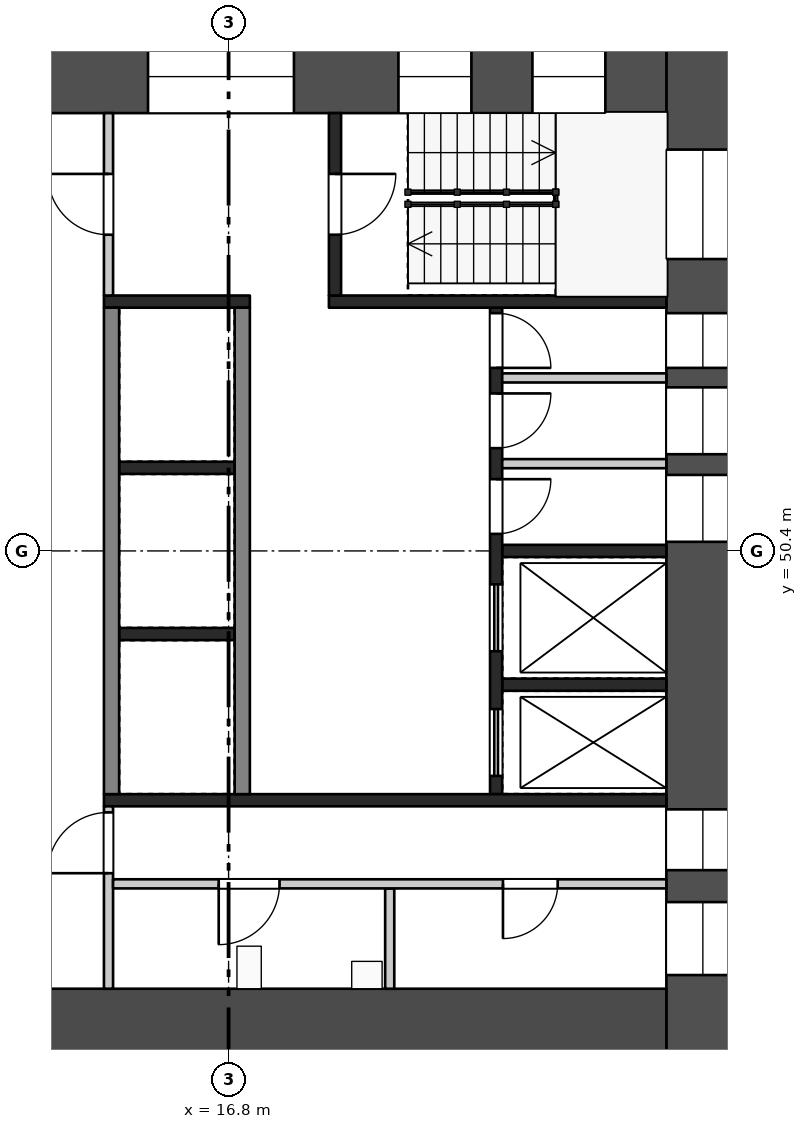
"""IFC4 building model, lengths in metres.
Left out: names, types, materials, properties, quantities, classifications, styles, units other than length and angle.
Written with IfcOpenShell. Run it as: python <this file> out.ifc"""

import sys

from ifc_helpers import new_model, si_unit, direction, frame, frame_2d, origin, place, context, subcontext, project, spatial, rectangle, extrude, element, fill, save


model = new_model("IFC4")
c1 = context("Model", 3, precision=1e-05, world=origin(), true_north=direction((0.0, 1.0)))
c2 = subcontext(c1, "Body", "Model", "MODEL_VIEW")
j1 = project(units=[si_unit("LENGTHUNIT", "METRE"), si_unit("PLANEANGLEUNIT", "RADIAN")], contexts=[c1])
p1 = place(None, origin())
s1 = spatial("IfcSite", under=j1, at=p1, CompositionType="ELEMENT")
p2 = place(p1, origin())
s2 = spatial("IfcBuilding", under=s1, at=p2, CompositionType="ELEMENT")
p3 = place(p2, frame((0.0, 0.0, 112.7)))
s3 = spatial("IfcBuildingStorey", under=s2, at=p3, CompositionType="ELEMENT", Elevation=112.7)
p4 = place(p3, frame((24.6, 58.8, 0.0), z_axis=(0.0, 0.0, 1.0), x_axis=(0.0, -1.0, 0.0)))
e1 = element("IfcWall", 1, at=p4, inside=s3, PredefinedType="SHEAR", context=c2, shape_type="SweptSolid", body=[
    extrude(rectangle(XDim=16.8, YDim=1.2, at=frame_2d((8.4, 0.0))), origin(), (0.0, 0.0, 1.0), 3.22),
])
p5 = place(p4, frame((1.8, 0.0, 0.5)))
e2 = element("IfcOpeningElement", 2, at=p5, cuts=e1, PredefinedType="OPENING", context=c2, shape_type="SweptSolid", body=[
    extrude(rectangle(XDim=1.8, YDim=2.4, at=frame_2d((0.9, 1.2))), frame((0.0, 0.61, 0.0), z_axis=(0.0, -1.0, 0.0), x_axis=(1.0, 0.0, 0.0)), (0.0, 0.0, 1.0), 1.22),
])
p6 = place(p4, frame((4.49, 0.0, 1.6)))
e3 = element("IfcOpeningElement", 3, at=p6, cuts=e1, PredefinedType="OPENING", context=c2, shape_type="SweptSolid", body=[
    extrude(rectangle(XDim=0.9, YDim=1.2, at=frame_2d((0.45, 0.6))), frame((0.0, 0.61, 0.0), z_axis=(0.0, -1.0, 0.0), x_axis=(1.0, 0.0, 0.0)), (0.0, 0.0, 1.0), 1.22),
])
p7 = place(p4, frame((5.71, 0.0, 1.6)))
e4 = element("IfcOpeningElement", 4, at=p7, cuts=e1, PredefinedType="OPENING", context=c2, shape_type="SweptSolid", body=[
    extrude(rectangle(XDim=1.1, YDim=1.2, at=frame_2d((0.55, 0.6))), frame((0.0, 0.61, 0.0), z_axis=(0.0, -1.0, 0.0), x_axis=(1.0, 0.0, 0.0)), (0.0, 0.0, 1.0), 1.22),
])
p8 = place(p4, frame((7.15, 0.0, 1.6)))
e5 = element("IfcOpeningElement", 5, at=p8, cuts=e1, PredefinedType="OPENING", context=c2, shape_type="SweptSolid", body=[
    extrude(rectangle(XDim=1.1, YDim=1.2, at=frame_2d((0.55, 0.6))), frame((0.0, 0.61, 0.0), z_axis=(0.0, -1.0, 0.0), x_axis=(1.0, 0.0, 0.0)), (0.0, 0.0, 1.0), 1.22),
])
p9 = place(p4, frame((12.65, 0.0, 0.6)))
e6 = element("IfcOpeningElement", 6, at=p9, cuts=e1, PredefinedType="OPENING", context=c2, shape_type="SweptSolid", body=[
    extrude(rectangle(XDim=1.0, YDim=2.1, at=frame_2d((0.5, 1.05))), frame((0.0, 0.61, 0.0), z_axis=(0.0, -1.0, 0.0), x_axis=(1.0, 0.0, 0.0)), (0.0, 0.0, 1.0), 1.22),
])
p10 = place(p4, frame((14.175, 0.0, 1.6)))
e7 = element("IfcOpeningElement", 7, at=p10, cuts=e1, PredefinedType="OPENING", context=c2, shape_type="SweptSolid", body=[
    extrude(rectangle(XDim=1.2, YDim=1.2, at=frame_2d((0.6, 0.6))), frame((0.0, 0.61, 0.0), z_axis=(0.0, -1.0, 0.0), x_axis=(1.0, 0.0, 0.0)), (0.0, 0.0, 1.0), 1.22),
])
p11 = place(p3, frame((9.6, 58.2, 0.0), z_axis=(0.0, 0.0, 1.0), x_axis=(1.0, 0.0, 0.0)))
e8 = element("IfcWall", 8, at=p11, inside=s3, PredefinedType="SHEAR", context=c2, shape_type="SweptSolid", body=[
    extrude(rectangle(XDim=14.4, YDim=1.2, at=frame_2d((7.2, 0.0))), origin(), (0.0, 0.0, 1.0), 3.22),
])
p12 = place(p11, frame((1.105, 0.0, 0.6)))
e9 = element("IfcOpeningElement", 9, at=p12, cuts=e8, PredefinedType="OPENING", context=c2, shape_type="SweptSolid", body=[
    extrude(rectangle(XDim=3.0, YDim=2.1, at=frame_2d((1.5, 1.05))), frame((0.0, 0.61, 0.0), z_axis=(0.0, -1.0, 0.0), x_axis=(1.0, 0.0, 0.0)), (0.0, 0.0, 1.0), 1.22),
])
p13 = place(p11, frame((5.875, 0.0, 0.6)))
e10 = element("IfcOpeningElement", 10, at=p13, cuts=e8, PredefinedType="OPENING", context=c2, shape_type="SweptSolid", body=[
    extrude(rectangle(XDim=2.4, YDim=2.1, at=frame_2d((1.2, 1.05))), frame((0.0, 0.61, 0.0), z_axis=(0.0, -1.0, 0.0), x_axis=(1.0, 0.0, 0.0)), (0.0, 0.0, 1.0), 1.22),
])
p14 = place(p11, frame((9.993, 0.0, 0.5)))
e11 = element("IfcOpeningElement", 11, at=p14, cuts=e8, PredefinedType="OPENING", context=c2, shape_type="SweptSolid", body=[
    extrude(rectangle(XDim=1.2, YDim=2.4, at=frame_2d((0.6, 1.2))), frame((0.0, 0.61, 0.0), z_axis=(0.0, -1.0, 0.0), x_axis=(1.0, 0.0, 0.0)), (0.0, 0.0, 1.0), 1.22),
])
p15 = place(p11, frame((12.197, 0.0, 0.5)))
e12 = element("IfcOpeningElement", 12, at=p15, cuts=e8, PredefinedType="OPENING", context=c2, shape_type="SweptSolid", body=[
    extrude(rectangle(XDim=1.2, YDim=2.4, at=frame_2d((0.6, 1.2))), frame((0.0, 0.61, 0.0), z_axis=(0.0, -1.0, 0.0), x_axis=(1.0, 0.0, 0.0)), (0.0, 0.0, 1.0), 1.22),
])
p16 = place(p3, frame((9.6, 42.6, 0.0), z_axis=(0.0, 0.0, 1.0), x_axis=(1.0, 0.0, 0.0)))
e13 = element("IfcWall", 13, at=p16, inside=s3, PredefinedType="SHEAR", context=c2, shape_type="SweptSolid", body=[
    extrude(rectangle(XDim=14.4, YDim=1.2, at=frame_2d((7.2, 0.0))), origin(), (0.0, 0.0, 1.0), 3.22),
])
p17 = place(p16, frame((2.1, 0.0, 0.0)))
e14 = element("IfcOpeningElement", 14, at=p17, cuts=e13, PredefinedType="OPENING", context=c2, shape_type="SweptSolid", body=[
    extrude(rectangle(XDim=1.8, YDim=2.1, at=frame_2d((0.9, 1.05))), frame((0.0, 0.61, 0.0), z_axis=(0.0, -1.0, 0.0), x_axis=(1.0, 0.0, 0.0)), (0.0, 0.0, 1.0), 1.22),
])
for number, where, z_axis, x_axis in (
    (15, (15.0, 51.767, 0.0), (0.0, 0.0, 1.0), (1.0, 0.0, 0.0)),
    (16, (15.0, 49.033, 0.0), (0.0, 0.0, 1.0), (1.0, 0.0, 0.0)),
):
    element("IfcWall", number, at=place(p3, frame(where, z_axis=z_axis, x_axis=x_axis)), inside=s3, PredefinedType="SHEAR", context=c2, shape_type="SweptSolid", body=[
        extrude(rectangle(XDim=1.9, YDim=0.2, at=frame_2d((0.95, 0.0))), origin(), (0.0, 0.0, 1.0), 3.22),
    ])
for number, where, z_axis, x_axis in (
    (17, (14.875, 54.4, 0.0), (0.0, 0.0, 1.0), (0.0, -1.0, 0.0)),
    (18, (17.025, 54.4, 0.0), (0.0, 0.0, 1.0), (0.0, -1.0, 0.0)),
):
    element("IfcWall", number, at=place(p3, frame(where, z_axis=z_axis, x_axis=x_axis)), inside=s3, PredefinedType="SHEAR", context=c2, shape_type="SweptSolid", body=[
        extrude(rectangle(XDim=8.0, YDim=0.25, at=frame_2d((4.0, 0.0))), origin(), (0.0, 0.0, 1.0), 3.22),
    ])
for number, where, z_axis, x_axis in (
    (19, (21.3, 50.4, 0.0), (0.0, 0.0, 1.0), (1.0, 0.0, 0.0)),
    (20, (21.3, 48.2, 0.0), (0.0, 0.0, 1.0), (1.0, 0.0, 0.0)),
):
    element("IfcWall", number, at=place(p3, frame(where, z_axis=z_axis, x_axis=x_axis)), inside=s3, PredefinedType="SHEAR", context=c2, shape_type="SweptSolid", body=[
        extrude(rectangle(XDim=2.7, YDim=0.2, at=frame_2d((1.35, 0.0))), origin(), (0.0, 0.0, 1.0), 3.22),
    ])
for number, where, z_axis, x_axis in (
    (21, (21.3, 53.245, 0.0), (0.0, 0.0, 1.0), (1.0, 0.0, 0.0)),
    (22, (21.3, 51.835, 0.0), (0.0, 0.0, 1.0), (1.0, 0.0, 0.0)),
):
    element("IfcWall", number, at=place(p3, frame(where, z_axis=z_axis, x_axis=x_axis)), inside=s3, PredefinedType="PARTITIONING", context=c2, shape_type="SweptSolid", body=[
        extrude(rectangle(XDim=2.7, YDim=0.15, at=frame_2d((1.35, 0.0))), origin(), (0.0, 0.0, 1.0), 3.22),
    ])
p18 = place(p3, frame((21.2, 54.4, 0.0), z_axis=(0.0, 0.0, 1.0), x_axis=(0.0, -1.0, 0.0)))
e23 = element("IfcWall", 23, at=p18, inside=s3, PredefinedType="SHEAR", context=c2, shape_type="SweptSolid", body=[
    extrude(rectangle(XDim=8.0, YDim=0.2, at=frame_2d((4.0, 0.0))), origin(), (0.0, 0.0, 1.0), 3.22),
])
p19 = place(p18, frame((0.09, 0.0, 0.0)))
e24 = element("IfcOpeningElement", 24, at=p19, cuts=e23, PredefinedType="OPENING", context=c2, shape_type="SweptSolid", body=[
    extrude(rectangle(XDim=0.9, YDim=2.1, at=frame_2d((0.45, 1.05))), frame((0.0, 0.11, 0.0), z_axis=(0.0, -1.0, 0.0), x_axis=(1.0, 0.0, 0.0)), (0.0, 0.0, 1.0), 0.22),
])
p20 = place(p18, frame((1.41, 0.0, 0.0)))
e25 = element("IfcOpeningElement", 25, at=p20, cuts=e23, PredefinedType="OPENING", context=c2, shape_type="SweptSolid", body=[
    extrude(rectangle(XDim=0.9, YDim=2.1, at=frame_2d((0.45, 1.05))), frame((0.0, 0.11, 0.0), z_axis=(0.0, -1.0, 0.0), x_axis=(1.0, 0.0, 0.0)), (0.0, 0.0, 1.0), 0.22),
])
p21 = place(p18, frame((2.82, 0.0, 0.0)))
e26 = element("IfcOpeningElement", 26, at=p21, cuts=e23, PredefinedType="OPENING", context=c2, shape_type="SweptSolid", body=[
    extrude(rectangle(XDim=0.9, YDim=2.1, at=frame_2d((0.45, 1.05))), frame((0.0, 0.11, 0.0), z_axis=(0.0, -1.0, 0.0), x_axis=(1.0, 0.0, 0.0)), (0.0, 0.0, 1.0), 0.22),
])
p22 = place(p18, frame((4.55, 0.0, 0.0)))
e27 = element("IfcOpeningElement", 27, at=p22, cuts=e23, PredefinedType="OPENING", context=c2, shape_type="SweptSolid", body=[
    extrude(rectangle(XDim=1.1, YDim=2.1, at=frame_2d((0.55, 1.05))), frame((0.0, 0.11, 0.0), z_axis=(0.0, -1.0, 0.0), x_axis=(1.0, 0.0, 0.0)), (0.0, 0.0, 1.0), 0.22),
])
p23 = place(p18, frame((6.6, 0.0, 0.0)))
e28 = element("IfcOpeningElement", 28, at=p23, cuts=e23, PredefinedType="OPENING", context=c2, shape_type="SweptSolid", body=[
    extrude(rectangle(XDim=1.1, YDim=2.1, at=frame_2d((0.55, 1.05))), frame((0.0, 0.11, 0.0), z_axis=(0.0, -1.0, 0.0), x_axis=(1.0, 0.0, 0.0)), (0.0, 0.0, 1.0), 0.22),
])
p24 = place(p3, frame((14.75, 54.5, 0.0), z_axis=(0.0, 0.0, 1.0), x_axis=(1.0, 0.0, 0.0)))
e29 = element("IfcWall", 29, at=p24, inside=s3, PredefinedType="SHEAR", context=c2, shape_type="SweptSolid", body=[
    extrude(rectangle(XDim=2.4, YDim=0.2, at=frame_2d((1.2, 0.0))), origin(), (0.0, 0.0, 1.0), 3.22),
])
p25 = place(p3, frame((18.45, 54.5, 0.0), z_axis=(0.0, 0.0, 1.0), x_axis=(1.0, 0.0, 0.0)))
e30 = element("IfcWall", 30, at=p25, inside=s3, PredefinedType="SHEAR", context=c2, shape_type="SweptSolid", body=[
    extrude(rectangle(XDim=5.55, YDim=0.2, at=frame_2d((2.775, 0.0))), origin(), (0.0, 0.0, 1.0), 3.22),
])
p26 = place(p3, frame((14.825, 57.6, 0.0), z_axis=(0.0, 0.0, 1.0), x_axis=(0.0, -1.0, 0.0)))
e31 = element("IfcWall", 31, at=p26, inside=s3, PredefinedType="PARTITIONING", context=c2, shape_type="SweptSolid", body=[
    extrude(rectangle(XDim=3.0, YDim=0.15, at=frame_2d((1.5, 0.0))), origin(), (0.0, 0.0, 1.0), 3.22),
])
p27 = place(p26, frame((1.0, 0.0, 0.0)))
e32 = element("IfcOpeningElement", 32, at=p27, cuts=e31, PredefinedType="OPENING", context=c2, shape_type="SweptSolid", body=[
    extrude(rectangle(XDim=1.0, YDim=2.1, at=frame_2d((0.5, 1.05))), frame((0.0, 0.085, 0.0), z_axis=(0.0, -1.0, 0.0), x_axis=(1.0, 0.0, 0.0)), (0.0, 0.0, 1.0), 0.17),
])
p28 = place(p3, frame((18.55, 57.6, 0.0), z_axis=(0.0, 0.0, 1.0), x_axis=(0.0, -1.0, 0.0)))
e33 = element("IfcWall", 33, at=p28, inside=s3, PredefinedType="SHEAR", context=c2, shape_type="SweptSolid", body=[
    extrude(rectangle(XDim=3.0, YDim=0.2, at=frame_2d((1.5, 0.0))), origin(), (0.0, 0.0, 1.0), 3.22),
])
p29 = place(p28, frame((1.0, 0.0, 0.0)))
e34 = element("IfcOpeningElement", 34, at=p29, cuts=e33, PredefinedType="OPENING", context=c2, shape_type="SweptSolid", body=[
    extrude(rectangle(XDim=1.0, YDim=2.1, at=frame_2d((0.5, 1.05))), frame((0.0, 0.11, 0.0), z_axis=(0.0, -1.0, 0.0), x_axis=(1.0, 0.0, 0.0)), (0.0, 0.0, 1.0), 0.22),
])
p30 = place(p3, frame((14.75, 46.3, 0.0), z_axis=(0.0, 0.0, 1.0), x_axis=(1.0, 0.0, 0.0)))
e35 = element("IfcWall", 35, at=p30, inside=s3, PredefinedType="SHEAR", context=c2, shape_type="SweptSolid", body=[
    extrude(rectangle(XDim=9.25, YDim=0.2, at=frame_2d((4.625, 0.0))), origin(), (0.0, 0.0, 1.0), 3.22),
])
p31 = place(p3, frame((14.825, 46.2, 0.0), z_axis=(0.0, 0.0, 1.0), x_axis=(0.0, -1.0, 0.0)))
e36 = element("IfcWall", 36, at=p31, inside=s3, PredefinedType="PARTITIONING", context=c2, shape_type="SweptSolid", body=[
    extrude(rectangle(XDim=3.0, YDim=0.15, at=frame_2d((1.5, 0.0))), origin(), (0.0, 0.0, 1.0), 3.22),
])
p32 = place(p31, frame((0.1, 0.0, 0.0)))
e37 = element("IfcOpeningElement", 37, at=p32, cuts=e36, PredefinedType="OPENING", context=c2, shape_type="SweptSolid", body=[
    extrude(rectangle(XDim=1.0, YDim=2.1, at=frame_2d((0.5, 1.05))), frame((0.0, 0.085, 0.0), z_axis=(0.0, -1.0, 0.0), x_axis=(1.0, 0.0, 0.0)), (0.0, 0.0, 1.0), 0.17),
])
p33 = place(p3, frame((19.45, 44.85, 0.0), z_axis=(0.0, 0.0, 1.0), x_axis=(0.0, -1.0, 0.0)))
e38 = element("IfcWall", 38, at=p33, inside=s3, PredefinedType="PARTITIONING", context=c2, shape_type="SweptSolid", body=[
    extrude(rectangle(XDim=1.65, YDim=0.15, at=frame_2d((0.825, 0.0))), origin(), (0.0, 0.0, 1.0), 3.22),
])
p34 = place(p3, frame((14.9, 44.925, 0.0), z_axis=(0.0, 0.0, 1.0), x_axis=(1.0, 0.0, 0.0)))
e39 = element("IfcWall", 39, at=p34, inside=s3, PredefinedType="PARTITIONING", context=c2, shape_type="SweptSolid", body=[
    extrude(rectangle(XDim=9.1, YDim=0.15, at=frame_2d((4.55, 0.0))), origin(), (0.0, 0.0, 1.0), 3.22),
])
p35 = place(p34, frame((1.738, 0.0, 0.0)))
e40 = element("IfcOpeningElement", 40, at=p35, cuts=e39, PredefinedType="OPENING", context=c2, shape_type="SweptSolid", body=[
    extrude(rectangle(XDim=1.0, YDim=2.1, at=frame_2d((0.5, 1.05))), frame((0.0, 0.085, 0.0), z_axis=(0.0, -1.0, 0.0), x_axis=(1.0, 0.0, 0.0)), (0.0, 0.0, 1.0), 0.17),
])
p36 = place(p34, frame((6.413, 0.0, 0.0)))
e41 = element("IfcOpeningElement", 41, at=p36, cuts=e39, PredefinedType="OPENING", context=c2, shape_type="SweptSolid", body=[
    extrude(rectangle(XDim=0.9, YDim=2.1, at=frame_2d((0.45, 1.05))), frame((0.0, 0.085, 0.0), z_axis=(0.0, -1.0, 0.0), x_axis=(1.0, 0.0, 0.0)), (0.0, 0.0, 1.0), 0.17),
])
p37 = place(p19, origin())
e42 = element("IfcDoor", 42, at=p37, inside=s3, OperationType="SINGLE_SWING_RIGHT", PredefinedType="DOOR", context=c2, shape_type="SweptSolid", body=[
    extrude(rectangle(XDim=0.9, YDim=2.1, at=frame_2d((0.45, 1.05))), frame((0.0, 0.025, 0.0), z_axis=(0.0, -1.0, 0.0), x_axis=(1.0, 0.0, 0.0)), (0.0, 0.0, 1.0), 0.05),
])
fill(e24, e42)
p38 = place(p20, origin())
e43 = element("IfcDoor", 43, at=p38, inside=s3, OperationType="SINGLE_SWING_LEFT", PredefinedType="DOOR", context=c2, shape_type="SweptSolid", body=[
    extrude(rectangle(XDim=0.9, YDim=2.1, at=frame_2d((0.45, 1.05))), frame((0.0, 0.025, 0.0), z_axis=(0.0, -1.0, 0.0), x_axis=(1.0, 0.0, 0.0)), (0.0, 0.0, 1.0), 0.05),
])
fill(e25, e43)
p39 = place(p21, origin())
e44 = element("IfcDoor", 44, at=p39, inside=s3, OperationType="SINGLE_SWING_LEFT", PredefinedType="DOOR", context=c2, shape_type="SweptSolid", body=[
    extrude(rectangle(XDim=0.9, YDim=2.1, at=frame_2d((0.45, 1.05))), frame((0.0, 0.025, 0.0), z_axis=(0.0, -1.0, 0.0), x_axis=(1.0, 0.0, 0.0)), (0.0, 0.0, 1.0), 0.05),
])
fill(e26, e44)
p40 = place(p22, origin())
e45 = element("IfcDoor", 45, at=p40, inside=s3, OperationType="DOUBLE_DOOR_SLIDING", PredefinedType="DOOR", context=c2, shape_type="SweptSolid", body=[
    extrude(rectangle(XDim=1.1, YDim=2.1, at=frame_2d((0.55, 1.05))), frame((0.0, 0.025, 0.0), z_axis=(0.0, -1.0, 0.0), x_axis=(1.0, 0.0, 0.0)), (0.0, 0.0, 1.0), 0.05),
])
fill(e27, e45)
p41 = place(p23, origin())
e46 = element("IfcDoor", 46, at=p41, inside=s3, OperationType="DOUBLE_DOOR_SLIDING", PredefinedType="DOOR", context=c2, shape_type="SweptSolid", body=[
    extrude(rectangle(XDim=1.1, YDim=2.1, at=frame_2d((0.55, 1.05))), frame((0.0, 0.025, 0.0), z_axis=(0.0, -1.0, 0.0), x_axis=(1.0, 0.0, 0.0)), (0.0, 0.0, 1.0), 0.05),
])
fill(e28, e46)
p42 = place(p27, frame((1.0, 0.0, 0.0), z_axis=(0.0, 0.0, 1.0), x_axis=(-1.0, 0.0, 0.0)))
e47 = element("IfcDoor", 47, at=p42, inside=s3, OperationType="SINGLE_SWING_RIGHT", PredefinedType="DOOR", context=c2, shape_type="SweptSolid", body=[
    extrude(rectangle(XDim=1.0, YDim=2.1, at=frame_2d((0.5, 1.05))), frame((0.0, 0.025, 0.0), z_axis=(0.0, -1.0, 0.0), x_axis=(1.0, 0.0, 0.0)), (0.0, 0.0, 1.0), 0.05),
])
fill(e32, e47)
p43 = place(p29, origin())
e48 = element("IfcDoor", 48, at=p43, inside=s3, OperationType="SINGLE_SWING_LEFT", PredefinedType="DOOR", context=c2, shape_type="SweptSolid", body=[
    extrude(rectangle(XDim=1.0, YDim=2.1, at=frame_2d((0.5, 1.05))), frame((0.0, 0.025, 0.0), z_axis=(0.0, -1.0, 0.0), x_axis=(1.0, 0.0, 0.0)), (0.0, 0.0, 1.0), 0.05),
])
fill(e34, e48)
p44 = place(p32, frame((1.0, 0.0, 0.0), z_axis=(0.0, 0.0, 1.0), x_axis=(-1.0, 0.0, 0.0)))
e49 = element("IfcDoor", 49, at=p44, inside=s3, OperationType="SINGLE_SWING_LEFT", PredefinedType="DOOR", context=c2, shape_type="SweptSolid", body=[
    extrude(rectangle(XDim=1.0, YDim=2.1, at=frame_2d((0.5, 1.05))), frame((0.0, 0.025, 0.0), z_axis=(0.0, -1.0, 0.0), x_axis=(1.0, 0.0, 0.0)), (0.0, 0.0, 1.0), 0.05),
])
fill(e37, e49)
p45 = place(p35, frame((1.0, 0.0, 0.0), z_axis=(0.0, 0.0, 1.0), x_axis=(-1.0, 0.0, 0.0)))
e50 = element("IfcDoor", 50, at=p45, inside=s3, OperationType="SINGLE_SWING_RIGHT", PredefinedType="DOOR", context=c2, shape_type="SweptSolid", body=[
    extrude(rectangle(XDim=1.0, YDim=2.1, at=frame_2d((0.5, 1.05))), frame((0.0, 0.025, 0.0), z_axis=(0.0, -1.0, 0.0), x_axis=(1.0, 0.0, 0.0)), (0.0, 0.0, 1.0), 0.05),
])
fill(e40, e50)
p46 = place(p36, frame((0.9, 0.0, 0.0), z_axis=(0.0, 0.0, 1.0), x_axis=(-1.0, 0.0, 0.0)))
e51 = element("IfcDoor", 51, at=p46, inside=s3, OperationType="SINGLE_SWING_RIGHT", PredefinedType="DOOR", context=c2, shape_type="SweptSolid", body=[
    extrude(rectangle(XDim=0.9, YDim=2.1, at=frame_2d((0.45, 1.05))), frame((0.0, 0.025, 0.0), z_axis=(0.0, -1.0, 0.0), x_axis=(1.0, 0.0, 0.0)), (0.0, 0.0, 1.0), 0.05),
])
fill(e41, e51)
p47 = place(p5, origin())
e52 = element("IfcWindow", 52, at=p47, inside=s3, PartitioningType="SINGLE_PANEL", PredefinedType="WINDOW", context=c2, shape_type="SweptSolid", body=[
    extrude(rectangle(XDim=1.8, YDim=2.4, at=frame_2d((0.9, 1.2))), frame((0.0, 0.03, 0.0), z_axis=(0.0, -1.0, 0.0), x_axis=(1.0, 0.0, 0.0)), (0.0, 0.0, 1.0), 0.06),
])
fill(e2, e52)
p48 = place(p6, origin())
e53 = element("IfcWindow", 53, at=p48, inside=s3, PartitioningType="SINGLE_PANEL", PredefinedType="WINDOW", context=c2, shape_type="SweptSolid", body=[
    extrude(rectangle(XDim=0.9, YDim=1.2, at=frame_2d((0.45, 0.6))), frame((0.0, 0.03, 0.0), z_axis=(0.0, -1.0, 0.0), x_axis=(1.0, 0.0, 0.0)), (0.0, 0.0, 1.0), 0.06),
])
fill(e3, e53)
p49 = place(p7, origin())
e54 = element("IfcWindow", 54, at=p49, inside=s3, PartitioningType="SINGLE_PANEL", PredefinedType="WINDOW", context=c2, shape_type="SweptSolid", body=[
    extrude(rectangle(XDim=1.1, YDim=1.2, at=frame_2d((0.55, 0.6))), frame((0.0, 0.03, 0.0), z_axis=(0.0, -1.0, 0.0), x_axis=(1.0, 0.0, 0.0)), (0.0, 0.0, 1.0), 0.06),
])
fill(e4, e54)
p50 = place(p8, origin())
e55 = element("IfcWindow", 55, at=p50, inside=s3, PartitioningType="SINGLE_PANEL", PredefinedType="WINDOW", context=c2, shape_type="SweptSolid", body=[
    extrude(rectangle(XDim=1.1, YDim=1.2, at=frame_2d((0.55, 0.6))), frame((0.0, 0.03, 0.0), z_axis=(0.0, -1.0, 0.0), x_axis=(1.0, 0.0, 0.0)), (0.0, 0.0, 1.0), 0.06),
])
fill(e5, e55)
p51 = place(p9, origin())
e56 = element("IfcWindow", 56, at=p51, inside=s3, PartitioningType="SINGLE_PANEL", PredefinedType="WINDOW", context=c2, shape_type="SweptSolid", body=[
    extrude(rectangle(XDim=1.0, YDim=2.1, at=frame_2d((0.5, 1.05))), frame((0.0, 0.03, 0.0), z_axis=(0.0, -1.0, 0.0), x_axis=(1.0, 0.0, 0.0)), (0.0, 0.0, 1.0), 0.06),
])
fill(e6, e56)
p52 = place(p10, origin())
e57 = element("IfcWindow", 57, at=p52, inside=s3, PartitioningType="SINGLE_PANEL", PredefinedType="WINDOW", context=c2, shape_type="SweptSolid", body=[
    extrude(rectangle(XDim=1.2, YDim=1.2, at=frame_2d((0.6, 0.6))), frame((0.0, 0.03, 0.0), z_axis=(0.0, -1.0, 0.0), x_axis=(1.0, 0.0, 0.0)), (0.0, 0.0, 1.0), 0.06),
])
fill(e7, e57)
p53 = place(p13, origin())
e58 = element("IfcWindow", 58, at=p53, inside=s3, PartitioningType="SINGLE_PANEL", PredefinedType="WINDOW", context=c2, shape_type="SweptSolid", body=[
    extrude(rectangle(XDim=2.4, YDim=2.1, at=frame_2d((1.2, 1.05))), frame((0.0, 0.03, 0.0), z_axis=(0.0, -1.0, 0.0), x_axis=(1.0, 0.0, 0.0)), (0.0, 0.0, 1.0), 0.06),
])
fill(e10, e58)
p54 = place(p14, origin())
e59 = element("IfcWindow", 59, at=p54, inside=s3, PartitioningType="SINGLE_PANEL", PredefinedType="WINDOW", context=c2, shape_type="SweptSolid", body=[
    extrude(rectangle(XDim=1.2, YDim=2.4, at=frame_2d((0.6, 1.2))), frame((0.0, 0.03, 0.0), z_axis=(0.0, -1.0, 0.0), x_axis=(1.0, 0.0, 0.0)), (0.0, 0.0, 1.0), 0.06),
])
fill(e11, e59)
p55 = place(p15, origin())
e60 = element("IfcWindow", 60, at=p55, inside=s3, PartitioningType="SINGLE_PANEL", PredefinedType="WINDOW", context=c2, shape_type="SweptSolid", body=[
    extrude(rectangle(XDim=1.2, YDim=2.4, at=frame_2d((0.6, 1.2))), frame((0.0, 0.03, 0.0), z_axis=(0.0, -1.0, 0.0), x_axis=(1.0, 0.0, 0.0)), (0.0, 0.0, 1.0), 0.06),
])
fill(e12, e60)
save(model, sys.argv[1])
